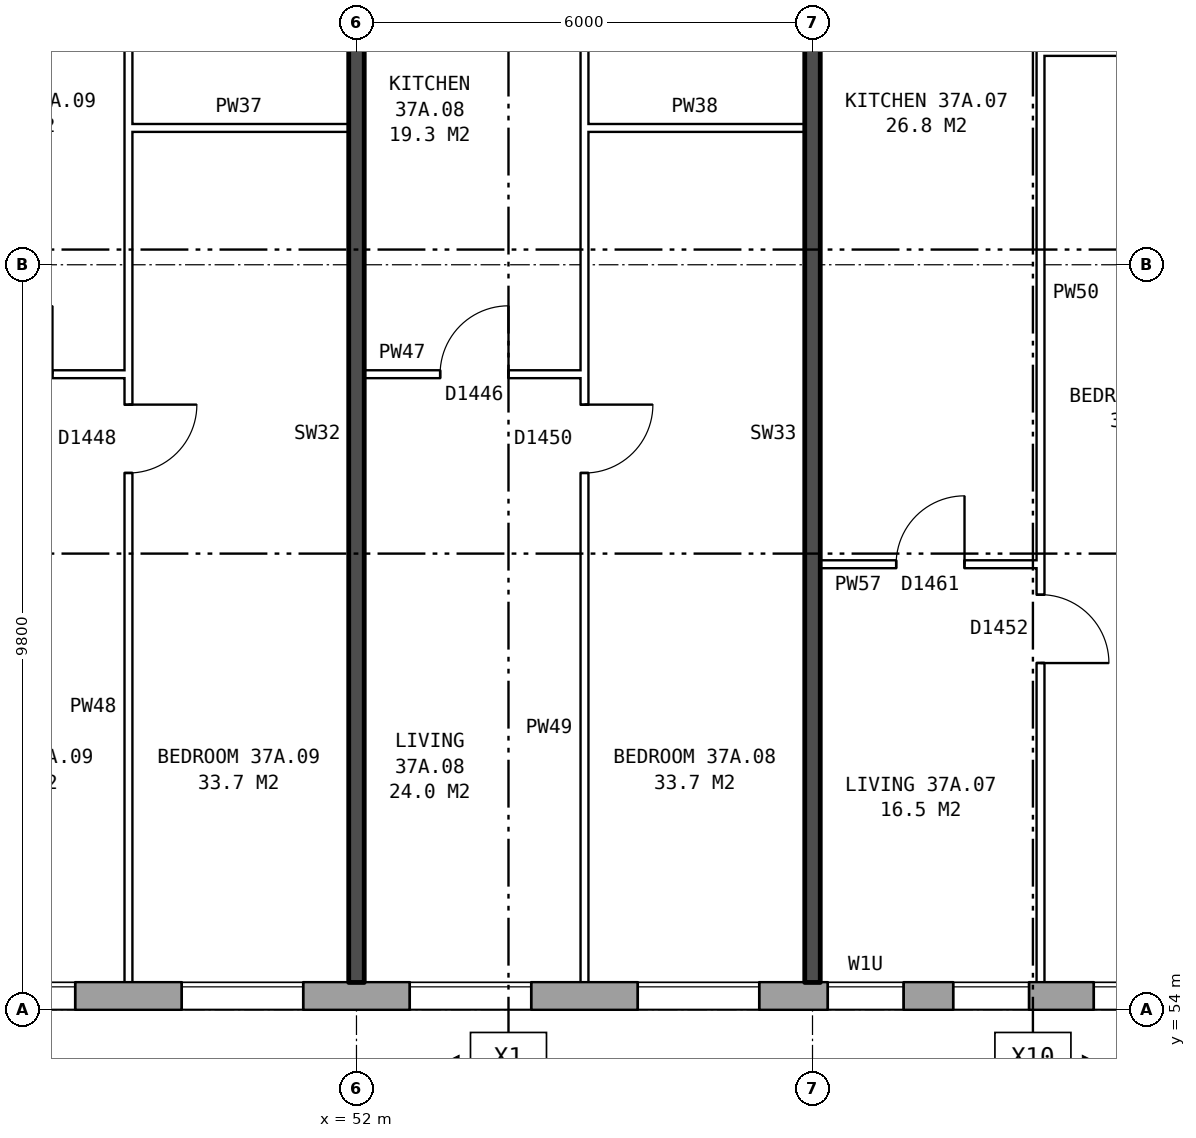
"""IFC4 building model, lengths in metres.
Left out: names, types, materials, properties, quantities, classifications, styles, units other than length and angle.
Written with IfcOpenShell. Run it as: python <this file> out.ifc"""

import sys

from ifc_helpers import new_model, si_unit, direction, frame, frame_2d, origin, place, context, subcontext, project, spatial, rectangle, extrude, element, fill, save


model = new_model("IFC4")
c1 = context("Model", 3, precision=1e-05, world=origin(), true_north=direction((0.0, 1.0)))
c2 = subcontext(c1, "Body", "Model", "MODEL_VIEW")
j1 = project(units=[si_unit("LENGTHUNIT", "METRE"), si_unit("PLANEANGLEUNIT", "RADIAN")], contexts=[c1])
p1 = place(None, origin())
s1 = spatial("IfcSite", under=j1, at=p1, CompositionType="ELEMENT")
p2 = place(p1, origin())
s2 = spatial("IfcBuilding", under=s1, at=p2, CompositionType="ELEMENT")
p3 = place(p2, frame((0.0, 0.0, 133.0)))
s3 = spatial("IfcBuildingStorey", under=s2, at=p3, CompositionType="ELEMENT", Elevation=133.0)
p4 = place(p3, frame((29.825, 54.18, 0.0), z_axis=(0.0, 0.0, 1.0), x_axis=(1.0, 0.0, 0.0)))
e1 = element("IfcWall", 1, at=p4, inside=s3, PredefinedType="STANDARD", context=c2, shape_type="SweptSolid", body=[
    extrude(rectangle(XDim=43.101, YDim=0.36, at=frame_2d((21.55, 0.0))), origin(), (0.0, 0.0, 1.0), 2.85),
])
p5 = place(p4, frame((1.875, 0.0, 0.8)))
e2 = element("IfcOpeningElement", 2, at=p5, cuts=e1, PredefinedType="OPENING", context=c2, shape_type="SweptSolid", body=[
    extrude(rectangle(XDim=1.6, YDim=1.8, at=frame_2d((0.8, 0.9))), frame((0.0, 0.19, 0.0), z_axis=(0.0, -1.0, 0.0), x_axis=(1.0, 0.0, 0.0)), (0.0, 0.0, 1.0), 0.38),
])
p6 = place(p4, frame((4.875, 0.0, 0.8)))
e3 = element("IfcOpeningElement", 3, at=p6, cuts=e1, PredefinedType="OPENING", context=c2, shape_type="SweptSolid", body=[
    extrude(rectangle(XDim=1.6, YDim=1.8, at=frame_2d((0.8, 0.9))), frame((0.0, 0.19, 0.0), z_axis=(0.0, -1.0, 0.0), x_axis=(1.0, 0.0, 0.0)), (0.0, 0.0, 1.0), 0.38),
])
p7 = place(p4, frame((7.875, 0.0, 0.8)))
e4 = element("IfcOpeningElement", 4, at=p7, cuts=e1, PredefinedType="OPENING", context=c2, shape_type="SweptSolid", body=[
    extrude(rectangle(XDim=1.6, YDim=1.8, at=frame_2d((0.8, 0.9))), frame((0.0, 0.19, 0.0), z_axis=(0.0, -1.0, 0.0), x_axis=(1.0, 0.0, 0.0)), (0.0, 0.0, 1.0), 0.38),
])
p8 = place(p4, frame((10.875, 0.0, 0.8)))
e5 = element("IfcOpeningElement", 5, at=p8, cuts=e1, PredefinedType="OPENING", context=c2, shape_type="SweptSolid", body=[
    extrude(rectangle(XDim=1.6, YDim=1.8, at=frame_2d((0.8, 0.9))), frame((0.0, 0.19, 0.0), z_axis=(0.0, -1.0, 0.0), x_axis=(1.0, 0.0, 0.0)), (0.0, 0.0, 1.0), 0.38),
])
p9 = place(p4, frame((14.275, 0.0, 0.8)))
e6 = element("IfcOpeningElement", 6, at=p9, cuts=e1, PredefinedType="OPENING", context=c2, shape_type="SweptSolid", body=[
    extrude(rectangle(XDim=0.8, YDim=0.9, at=frame_2d((0.4, 0.45))), frame((0.0, 0.19, 0.0), z_axis=(0.0, -1.0, 0.0), x_axis=(1.0, 0.0, 0.0)), (0.0, 0.0, 1.0), 0.38),
])
p10 = place(p4, frame((16.875, 0.0, 0.8)))
e7 = element("IfcOpeningElement", 7, at=p10, cuts=e1, PredefinedType="OPENING", context=c2, shape_type="SweptSolid", body=[
    extrude(rectangle(XDim=1.6, YDim=1.8, at=frame_2d((0.8, 0.9))), frame((0.0, 0.19, 0.0), z_axis=(0.0, -1.0, 0.0), x_axis=(1.0, 0.0, 0.0)), (0.0, 0.0, 1.0), 0.38),
])
p11 = place(p4, frame((19.875, 0.0, 0.8)))
e8 = element("IfcOpeningElement", 8, at=p11, cuts=e1, PredefinedType="OPENING", context=c2, shape_type="SweptSolid", body=[
    extrude(rectangle(XDim=1.6, YDim=1.8, at=frame_2d((0.8, 0.9))), frame((0.0, 0.19, 0.0), z_axis=(0.0, -1.0, 0.0), x_axis=(1.0, 0.0, 0.0)), (0.0, 0.0, 1.0), 0.38),
])
p12 = place(p4, frame((22.875, 0.0, 0.8)))
e9 = element("IfcOpeningElement", 9, at=p12, cuts=e1, PredefinedType="OPENING", context=c2, shape_type="SweptSolid", body=[
    extrude(rectangle(XDim=1.6, YDim=1.8, at=frame_2d((0.8, 0.9))), frame((0.0, 0.19, 0.0), z_axis=(0.0, -1.0, 0.0), x_axis=(1.0, 0.0, 0.0)), (0.0, 0.0, 1.0), 0.38),
])
p13 = place(p4, frame((25.875, 0.0, 0.8)))
e10 = element("IfcOpeningElement", 10, at=p13, cuts=e1, PredefinedType="OPENING", context=c2, shape_type="SweptSolid", body=[
    extrude(rectangle(XDim=1.6, YDim=1.8, at=frame_2d((0.8, 0.9))), frame((0.0, 0.19, 0.0), z_axis=(0.0, -1.0, 0.0), x_axis=(1.0, 0.0, 0.0)), (0.0, 0.0, 1.0), 0.38),
])
p14 = place(p4, frame((28.375, 0.0, 0.25)))
e11 = element("IfcOpeningElement", 11, at=p14, cuts=e1, PredefinedType="OPENING", context=c2, shape_type="SweptSolid", body=[
    extrude(rectangle(XDim=1.0, YDim=0.9, at=frame_2d((0.5, 0.45))), frame((0.0, 0.19, 0.0), z_axis=(0.0, -1.0, 0.0), x_axis=(1.0, 0.0, 0.0)), (0.0, 0.0, 1.0), 0.38),
])
p15 = place(p4, frame((31.875, 0.0, 0.8)))
e12 = element("IfcOpeningElement", 12, at=p15, cuts=e1, PredefinedType="OPENING", context=c2, shape_type="SweptSolid", body=[
    extrude(rectangle(XDim=1.6, YDim=1.8, at=frame_2d((0.8, 0.9))), frame((0.0, 0.19, 0.0), z_axis=(0.0, -1.0, 0.0), x_axis=(1.0, 0.0, 0.0)), (0.0, 0.0, 1.0), 0.38),
])
p16 = place(p4, frame((34.875, 0.0, 0.8)))
e13 = element("IfcOpeningElement", 13, at=p16, cuts=e1, PredefinedType="OPENING", context=c2, shape_type="SweptSolid", body=[
    extrude(rectangle(XDim=1.6, YDim=1.8, at=frame_2d((0.8, 0.9))), frame((0.0, 0.19, 0.0), z_axis=(0.0, -1.0, 0.0), x_axis=(1.0, 0.0, 0.0)), (0.0, 0.0, 1.0), 0.38),
])
p17 = place(p4, frame((37.875, 0.0, 0.8)))
e14 = element("IfcOpeningElement", 14, at=p17, cuts=e1, PredefinedType="OPENING", context=c2, shape_type="SweptSolid", body=[
    extrude(rectangle(XDim=1.6, YDim=1.8, at=frame_2d((0.8, 0.9))), frame((0.0, 0.19, 0.0), z_axis=(0.0, -1.0, 0.0), x_axis=(1.0, 0.0, 0.0)), (0.0, 0.0, 1.0), 0.38),
])
p18 = place(p4, frame((40.875, 0.0, 0.8)))
e15 = element("IfcOpeningElement", 15, at=p18, cuts=e1, PredefinedType="OPENING", context=c2, shape_type="SweptSolid", body=[
    extrude(rectangle(XDim=1.6, YDim=1.8, at=frame_2d((0.8, 0.9))), frame((0.0, 0.19, 0.0), z_axis=(0.0, -1.0, 0.0), x_axis=(1.0, 0.0, 0.0)), (0.0, 0.0, 1.0), 0.38),
])
p19 = place(p4, frame((15.375, 0.0, 0.8)))
e16 = element("IfcOpeningElement", 16, at=p19, cuts=e1, PredefinedType="OPENING", context=c2, shape_type="SweptSolid", body=[
    extrude(rectangle(XDim=0.6, YDim=1.8, at=frame_2d((0.3, 0.9))), frame((0.0, 0.19, 0.0), z_axis=(0.0, -1.0, 0.0), x_axis=(1.0, 0.0, 0.0)), (0.0, 0.0, 1.0), 0.38),
])
p20 = place(p4, frame((30.025, 0.0, 1.65)))
e17 = element("IfcOpeningElement", 17, at=p20, cuts=e1, PredefinedType="OPENING", context=c2, shape_type="SweptSolid", body=[
    extrude(rectangle(XDim=1.0, YDim=0.9, at=frame_2d((0.5, 0.45))), frame((0.0, 0.19, 0.0), z_axis=(0.0, -1.0, 0.0), x_axis=(1.0, 0.0, 0.0)), (0.0, 0.0, 1.0), 0.38),
])
p21 = place(p3, frame((58.1, 59.86, 0.0), z_axis=(0.0, 0.0, 1.0), x_axis=(1.0, 0.0, 0.0)))
e18 = element("IfcWall", 18, at=p21, inside=s3, PredefinedType="PARTITIONING", context=c2, shape_type="SweptSolid", body=[
    extrude(rectangle(XDim=2.9, YDim=0.1, at=frame_2d((1.45, 0.0))), origin(), (0.0, 0.0, 1.0), 2.85),
])
p22 = place(p21, frame((1.0, 0.0, 0.0)))
e19 = element("IfcOpeningElement", 19, at=p22, cuts=e18, PredefinedType="OPENING", context=c2, shape_type="SweptSolid", body=[
    extrude(rectangle(XDim=0.9, YDim=2.1, at=frame_2d((0.45, 1.05))), frame((0.0, 0.06, 0.0), z_axis=(0.0, -1.0, 0.0), x_axis=(1.0, 0.0, 0.0)), (0.0, 0.0, 1.0), 0.12),
])
p23 = place(p3, frame((46.1, 62.36, 0.0), z_axis=(0.0, 0.0, 1.0), x_axis=(1.0, 0.0, 0.0)))
e20 = element("IfcWall", 20, at=p23, inside=s3, PredefinedType="PARTITIONING", context=c2, shape_type="SweptSolid", body=[
    extrude(rectangle(XDim=2.9, YDim=0.1, at=frame_2d((1.45, 0.0))), origin(), (0.0, 0.0, 1.0), 2.85),
])
p24 = place(p23, frame((1.0, 0.0, 0.0)))
e21 = element("IfcOpeningElement", 21, at=p24, cuts=e20, PredefinedType="OPENING", context=c2, shape_type="SweptSolid", body=[
    extrude(rectangle(XDim=0.9, YDim=2.1, at=frame_2d((0.45, 1.05))), frame((0.0, 0.06, 0.0), z_axis=(0.0, -1.0, 0.0), x_axis=(1.0, 0.0, 0.0)), (0.0, 0.0, 1.0), 0.12),
])
p25 = place(p3, frame((52.1, 62.36, 0.0), z_axis=(0.0, 0.0, 1.0), x_axis=(1.0, 0.0, 0.0)))
e22 = element("IfcWall", 22, at=p25, inside=s3, PredefinedType="PARTITIONING", context=c2, shape_type="SweptSolid", body=[
    extrude(rectangle(XDim=2.9, YDim=0.1, at=frame_2d((1.45, 0.0))), origin(), (0.0, 0.0, 1.0), 2.85),
])
p26 = place(p25, frame((1.0, 0.0, 0.0)))
e23 = element("IfcOpeningElement", 23, at=p26, cuts=e22, PredefinedType="OPENING", context=c2, shape_type="SweptSolid", body=[
    extrude(rectangle(XDim=0.9, YDim=2.1, at=frame_2d((0.45, 1.05))), frame((0.0, 0.06, 0.0), z_axis=(0.0, -1.0, 0.0), x_axis=(1.0, 0.0, 0.0)), (0.0, 0.0, 1.0), 0.12),
])
for number, where, z_axis, x_axis in (
    (24, (49.0, 65.6, 0.0), (0.0, 0.0, 1.0), (1.0, 0.0, 0.0)),
    (25, (55.0, 65.6, 0.0), (0.0, 0.0, 1.0), (1.0, 0.0, 0.0)),
):
    element("IfcWall", number, at=place(p3, frame(where, z_axis=z_axis, x_axis=x_axis)), inside=s3, PredefinedType="PARTITIONING", context=c2, shape_type="SweptSolid", body=[
        extrude(rectangle(XDim=2.9, YDim=0.1, at=frame_2d((1.45, 0.0))), origin(), (0.0, 0.0, 1.0), 2.85),
    ])
p27 = place(p3, frame((61.0, 66.6, 0.0), z_axis=(0.0, 0.0, 1.0), x_axis=(1.0, 0.0, 0.0)))
e26 = element("IfcWall", 26, at=p27, inside=s3, PredefinedType="PARTITIONING", context=c2, shape_type="SweptSolid", body=[
    extrude(rectangle(XDim=2.64, YDim=0.1, at=frame_2d((1.32, 0.0))), origin(), (0.0, 0.0, 1.0), 2.85),
])
p28 = place(p3, frame((49.0, 54.36, 0.0), z_axis=(0.0, 0.0, 1.0), x_axis=(0.0, 1.0, 0.0)))
e27 = element("IfcWall", 27, at=p28, inside=s3, PredefinedType="PARTITIONING", context=c2, shape_type="SweptSolid", body=[
    extrude(rectangle(XDim=14.34, YDim=0.1, at=frame_2d((7.17, 0.0))), origin(), (0.0, 0.0, 1.0), 2.85),
])
p29 = place(p28, frame((6.7, 0.0, 0.0)))
e28 = element("IfcOpeningElement", 28, at=p29, cuts=e27, PredefinedType="OPENING", context=c2, shape_type="SweptSolid", body=[
    extrude(rectangle(XDim=0.9, YDim=2.1, at=frame_2d((0.45, 1.05))), frame((0.0, 0.06, 0.0), z_axis=(0.0, -1.0, 0.0), x_axis=(1.0, 0.0, 0.0)), (0.0, 0.0, 1.0), 0.12),
])
p30 = place(p28, frame((13.04, 0.0, 0.0)))
e29 = element("IfcOpeningElement", 29, at=p30, cuts=e27, PredefinedType="OPENING", context=c2, shape_type="SweptSolid", body=[
    extrude(rectangle(XDim=0.9, YDim=2.1, at=frame_2d((0.45, 1.05))), frame((0.0, 0.06, 0.0), z_axis=(0.0, -1.0, 0.0), x_axis=(1.0, 0.0, 0.0)), (0.0, 0.0, 1.0), 0.12),
])
p31 = place(p3, frame((52.0, 54.36, 0.0), z_axis=(0.0, 0.0, 1.0), x_axis=(0.0, 1.0, 0.0)))
e30 = element("IfcWall", 30, at=p31, inside=s3, PredefinedType="SOLIDWALL", context=c2, shape_type="SweptSolid", body=[
    extrude(rectangle(XDim=14.44, YDim=0.2, at=frame_2d((7.22, 0.0))), origin(), (0.0, 0.0, 1.0), 2.85),
])
p32 = place(p3, frame((55.0, 54.36, 0.0), z_axis=(0.0, 0.0, 1.0), x_axis=(0.0, 1.0, 0.0)))
e31 = element("IfcWall", 31, at=p32, inside=s3, PredefinedType="PARTITIONING", context=c2, shape_type="SweptSolid", body=[
    extrude(rectangle(XDim=14.34, YDim=0.1, at=frame_2d((7.17, 0.0))), origin(), (0.0, 0.0, 1.0), 2.85),
])
p33 = place(p32, frame((6.7, 0.0, 0.0)))
e32 = element("IfcOpeningElement", 32, at=p33, cuts=e31, PredefinedType="OPENING", context=c2, shape_type="SweptSolid", body=[
    extrude(rectangle(XDim=0.9, YDim=2.1, at=frame_2d((0.45, 1.05))), frame((0.0, 0.06, 0.0), z_axis=(0.0, -1.0, 0.0), x_axis=(1.0, 0.0, 0.0)), (0.0, 0.0, 1.0), 0.12),
])
p34 = place(p32, frame((13.04, 0.0, 0.0)))
e33 = element("IfcOpeningElement", 33, at=p34, cuts=e31, PredefinedType="OPENING", context=c2, shape_type="SweptSolid", body=[
    extrude(rectangle(XDim=0.9, YDim=2.1, at=frame_2d((0.45, 1.05))), frame((0.0, 0.06, 0.0), z_axis=(0.0, -1.0, 0.0), x_axis=(1.0, 0.0, 0.0)), (0.0, 0.0, 1.0), 0.12),
])
p35 = place(p3, frame((58.0, 54.36, 0.0), z_axis=(0.0, 0.0, 1.0), x_axis=(0.0, 1.0, 0.0)))
e34 = element("IfcWall", 34, at=p35, inside=s3, PredefinedType="SOLIDWALL", context=c2, shape_type="SweptSolid", body=[
    extrude(rectangle(XDim=14.44, YDim=0.2, at=frame_2d((7.22, 0.0))), origin(), (0.0, 0.0, 1.0), 2.85),
])
p36 = place(p3, frame((61.0, 54.36, 0.0), z_axis=(0.0, 0.0, 1.0), x_axis=(0.0, 1.0, 0.0)))
e35 = element("IfcWall", 35, at=p36, inside=s3, PredefinedType="PARTITIONING", context=c2, shape_type="SweptSolid", body=[
    extrude(rectangle(XDim=14.34, YDim=0.1, at=frame_2d((7.17, 0.0))), origin(), (0.0, 0.0, 1.0), 2.85),
])
p37 = place(p36, frame((4.2, 0.0, 0.0)))
e36 = element("IfcOpeningElement", 36, at=p37, cuts=e35, PredefinedType="OPENING", context=c2, shape_type="SweptSolid", body=[
    extrude(rectangle(XDim=0.9, YDim=2.1, at=frame_2d((0.45, 1.05))), frame((0.0, 0.06, 0.0), z_axis=(0.0, -1.0, 0.0), x_axis=(1.0, 0.0, 0.0)), (0.0, 0.0, 1.0), 0.12),
])
p38 = place(p36, frame((13.04, 0.0, 0.0)))
e37 = element("IfcOpeningElement", 37, at=p38, cuts=e35, PredefinedType="OPENING", context=c2, shape_type="SweptSolid", body=[
    extrude(rectangle(XDim=0.9, YDim=2.1, at=frame_2d((0.45, 1.05))), frame((0.0, 0.06, 0.0), z_axis=(0.0, -1.0, 0.0), x_axis=(1.0, 0.0, 0.0)), (0.0, 0.0, 1.0), 0.12),
])
p39 = place(p10, origin())
e38 = element("IfcWindow", 38, at=p39, inside=s3, PartitioningType="SINGLE_PANEL", PredefinedType="WINDOW", context=c2, shape_type="SweptSolid", body=[
    extrude(rectangle(XDim=1.6, YDim=1.8, at=frame_2d((0.8, 0.9))), frame((0.0, 0.15, 0.0), z_axis=(0.0, -1.0, 0.0), x_axis=(1.0, 0.0, 0.0)), (0.0, 0.0, 1.0), 0.06),
])
fill(e7, e38)
p40 = place(p11, origin())
e39 = element("IfcWindow", 39, at=p40, inside=s3, PartitioningType="SINGLE_PANEL", PredefinedType="WINDOW", context=c2, shape_type="SweptSolid", body=[
    extrude(rectangle(XDim=1.6, YDim=1.8, at=frame_2d((0.8, 0.9))), frame((0.0, 0.15, 0.0), z_axis=(0.0, -1.0, 0.0), x_axis=(1.0, 0.0, 0.0)), (0.0, 0.0, 1.0), 0.06),
])
fill(e8, e39)
p41 = place(p12, origin())
e40 = element("IfcWindow", 40, at=p41, inside=s3, PartitioningType="SINGLE_PANEL", PredefinedType="WINDOW", context=c2, shape_type="SweptSolid", body=[
    extrude(rectangle(XDim=1.6, YDim=1.8, at=frame_2d((0.8, 0.9))), frame((0.0, 0.15, 0.0), z_axis=(0.0, -1.0, 0.0), x_axis=(1.0, 0.0, 0.0)), (0.0, 0.0, 1.0), 0.06),
])
fill(e9, e40)
p42 = place(p13, origin())
e41 = element("IfcWindow", 41, at=p42, inside=s3, PartitioningType="SINGLE_PANEL", PredefinedType="WINDOW", context=c2, shape_type="SweptSolid", body=[
    extrude(rectangle(XDim=1.6, YDim=1.8, at=frame_2d((0.8, 0.9))), frame((0.0, 0.15, 0.0), z_axis=(0.0, -1.0, 0.0), x_axis=(1.0, 0.0, 0.0)), (0.0, 0.0, 1.0), 0.06),
])
fill(e10, e41)
p43 = place(p14, origin())
e42 = element("IfcWindow", 42, at=p43, inside=s3, PartitioningType="SINGLE_PANEL", PredefinedType="WINDOW", context=c2, shape_type="SweptSolid", body=[
    extrude(rectangle(XDim=1.0, YDim=0.9, at=frame_2d((0.5, 0.45))), frame((0.0, 0.15, 0.0), z_axis=(0.0, -1.0, 0.0), x_axis=(1.0, 0.0, 0.0)), (0.0, 0.0, 1.0), 0.06),
])
fill(e11, e42)
p44 = place(p15, origin())
e43 = element("IfcWindow", 43, at=p44, inside=s3, PartitioningType="SINGLE_PANEL", PredefinedType="WINDOW", context=c2, shape_type="SweptSolid", body=[
    extrude(rectangle(XDim=1.6, YDim=1.8, at=frame_2d((0.8, 0.9))), frame((0.0, 0.15, 0.0), z_axis=(0.0, -1.0, 0.0), x_axis=(1.0, 0.0, 0.0)), (0.0, 0.0, 1.0), 0.06),
])
fill(e12, e43)
p45 = place(p37, frame((0.9, 0.0, 0.0), z_axis=(0.0, 0.0, 1.0), x_axis=(-1.0, 0.0, 0.0)))
e44 = element("IfcDoor", 44, at=p45, inside=s3, OperationType="SINGLE_SWING_RIGHT", PredefinedType="DOOR", context=c2, shape_type="SweptSolid", body=[
    extrude(rectangle(XDim=0.9, YDim=2.1, at=frame_2d((0.45, 1.05))), frame((0.0, 0.025, 0.0), z_axis=(0.0, -1.0, 0.0), x_axis=(1.0, 0.0, 0.0)), (0.0, 0.0, 1.0), 0.05),
])
fill(e36, e44)
p46 = place(p22, origin())
e45 = element("IfcDoor", 45, at=p46, inside=s3, OperationType="SINGLE_SWING_RIGHT", PredefinedType="DOOR", context=c2, shape_type="SweptSolid", body=[
    extrude(rectangle(XDim=0.9, YDim=2.1, at=frame_2d((0.45, 1.05))), frame((0.0, 0.025, 0.0), z_axis=(0.0, -1.0, 0.0), x_axis=(1.0, 0.0, 0.0)), (0.0, 0.0, 1.0), 0.05),
])
fill(e19, e45)
p47 = place(p33, frame((0.9, 0.0, 0.0), z_axis=(0.0, 0.0, 1.0), x_axis=(-1.0, 0.0, 0.0)))
e46 = element("IfcDoor", 46, at=p47, inside=s3, OperationType="SINGLE_SWING_LEFT", PredefinedType="DOOR", context=c2, shape_type="SweptSolid", body=[
    extrude(rectangle(XDim=0.9, YDim=2.1, at=frame_2d((0.45, 1.05))), frame((0.0, 0.025, 0.0), z_axis=(0.0, -1.0, 0.0), x_axis=(1.0, 0.0, 0.0)), (0.0, 0.0, 1.0), 0.05),
])
fill(e32, e46)
p48 = place(p26, origin())
e47 = element("IfcDoor", 47, at=p48, inside=s3, OperationType="SINGLE_SWING_RIGHT", PredefinedType="DOOR", context=c2, shape_type="SweptSolid", body=[
    extrude(rectangle(XDim=0.9, YDim=2.1, at=frame_2d((0.45, 1.05))), frame((0.0, 0.025, 0.0), z_axis=(0.0, -1.0, 0.0), x_axis=(1.0, 0.0, 0.0)), (0.0, 0.0, 1.0), 0.05),
])
fill(e23, e47)
p49 = place(p29, frame((0.9, 0.0, 0.0), z_axis=(0.0, 0.0, 1.0), x_axis=(-1.0, 0.0, 0.0)))
e48 = element("IfcDoor", 48, at=p49, inside=s3, OperationType="SINGLE_SWING_LEFT", PredefinedType="DOOR", context=c2, shape_type="SweptSolid", body=[
    extrude(rectangle(XDim=0.9, YDim=2.1, at=frame_2d((0.45, 1.05))), frame((0.0, 0.025, 0.0), z_axis=(0.0, -1.0, 0.0), x_axis=(1.0, 0.0, 0.0)), (0.0, 0.0, 1.0), 0.05),
])
fill(e28, e48)
p50 = place(p20, origin())
e49 = element("IfcWindow", 49, at=p50, inside=s3, PartitioningType="SINGLE_PANEL", PredefinedType="WINDOW", context=c2, shape_type="SweptSolid", body=[
    extrude(rectangle(XDim=1.0, YDim=0.9, at=frame_2d((0.5, 0.45))), frame((0.0, 0.15, 0.0), z_axis=(0.0, -1.0, 0.0), x_axis=(1.0, 0.0, 0.0)), (0.0, 0.0, 1.0), 0.06),
])
fill(e17, e49)
save(model, sys.argv[1])
